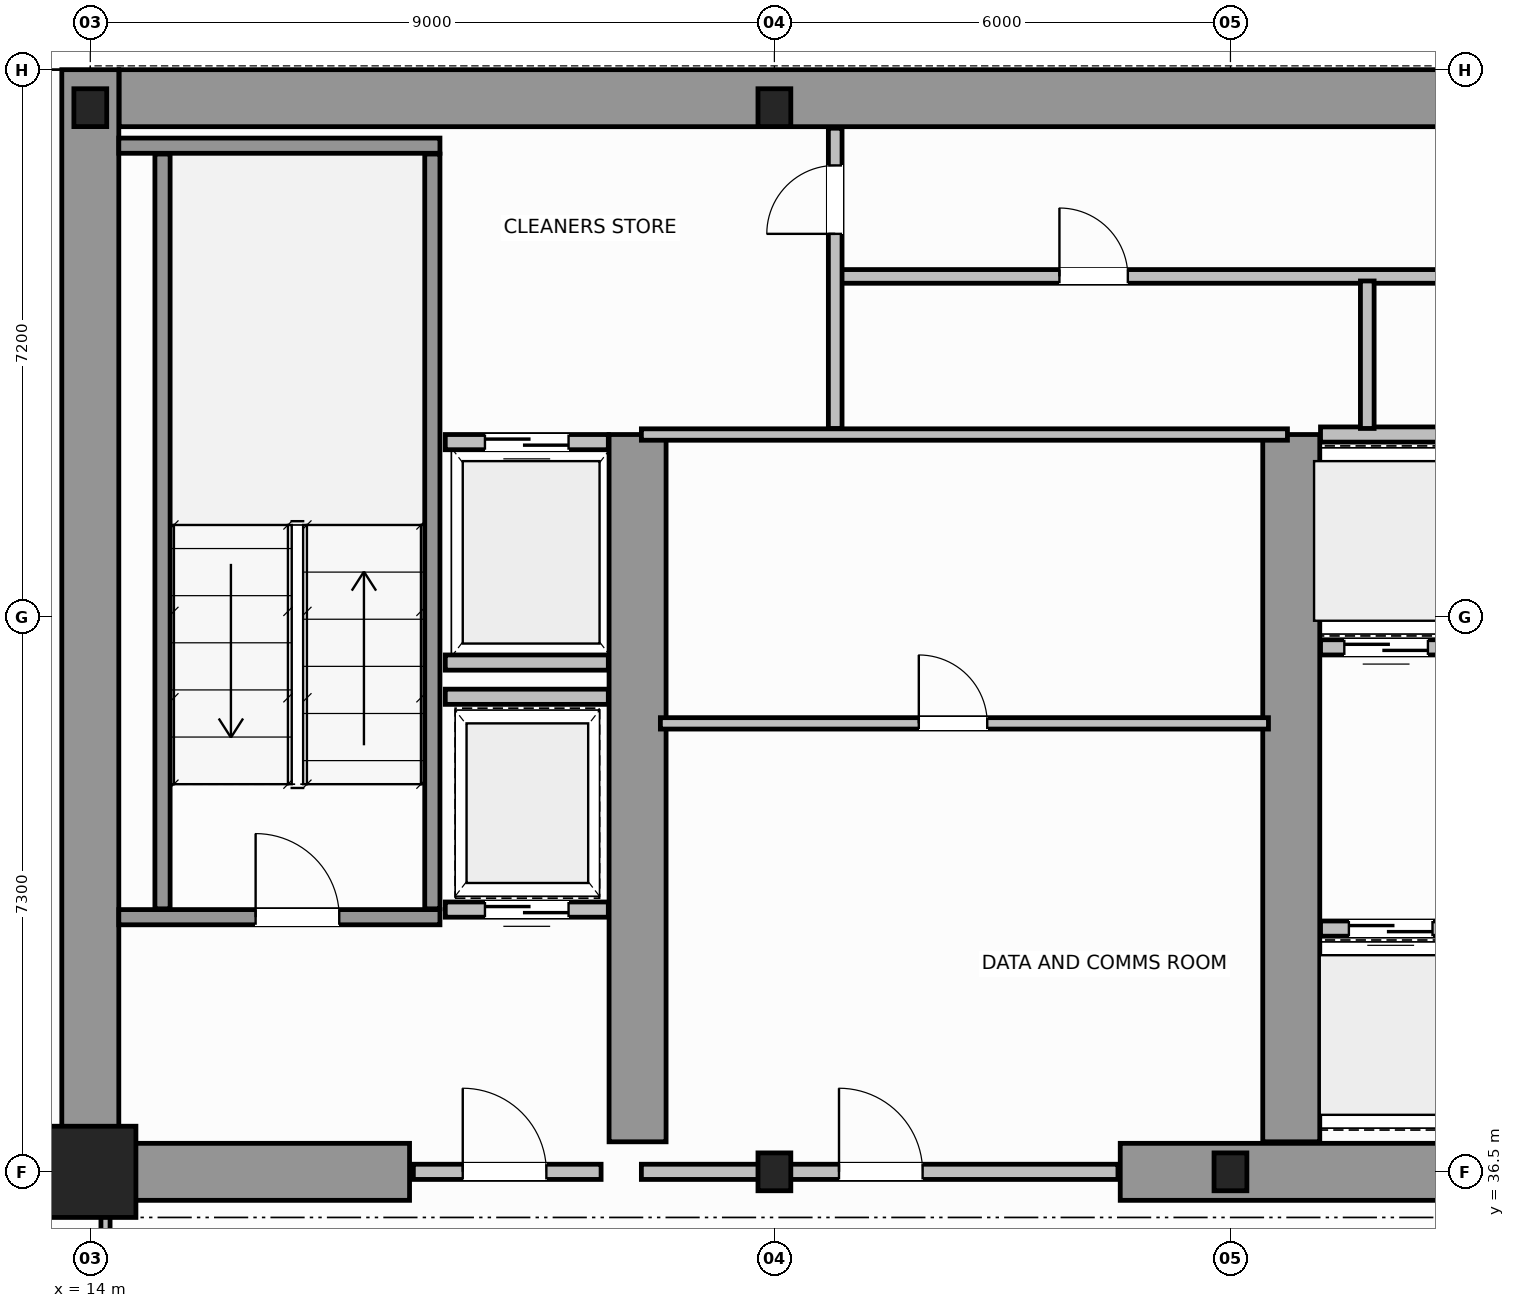
"""IFC4 building model, lengths in metres.
Left out: names, types, materials, properties, quantities, classifications, styles, units other than length and angle.
Written with IfcOpenShell. Run it as: python <this file> out.ifc"""

import sys

from ifc_helpers import new_model, si_unit, direction, frame, frame_2d, origin, origin_2d, place, context, subcontext, project, spatial, rectangle, i_section, extrude, source, transform, mapped, element, fill, save


model = new_model("IFC4")
c1 = context("Model", 3, precision=1e-05, world=origin(), true_north=direction((0.0, 1.0)))
c2 = subcontext(c1, "Body", "Model", "MODEL_VIEW")
j1 = project(units=[si_unit("LENGTHUNIT", "METRE"), si_unit("PLANEANGLEUNIT", "RADIAN")], contexts=[c1])
p1 = place(None, origin())
s1 = spatial("IfcSite", under=j1, at=p1, CompositionType="ELEMENT")
p2 = place(p1, origin())
s2 = spatial("IfcBuilding", under=s1, at=p2, CompositionType="ELEMENT")
p3 = place(p2, frame((0.0, 0.0, 153.8)))
s3 = spatial("IfcBuildingStorey", under=s2, at=p3, CompositionType="ELEMENT", Elevation=153.8)
m1 = source(origin(), c2, "Body", "SweptSolid", [
    extrude(rectangle(XDim=1.2, YDim=1.2, at=origin_2d()), origin(), (0.0, 0.0, 1.0), 3.8),
])
p4 = place(p3, frame((14.0, 36.5, 0.0), z_axis=(0.0, 0.0, 1.0), x_axis=(1.0, 0.0, 0.0)))
e1 = element("IfcColumn", 1, at=p4, inside=s3, PredefinedType="COLUMN", context=c2, shape_type="MappedRepresentation", body=[
    mapped(m1, transform((0.0, 0.0, 0.0), scale=1.0)),
])
m2 = source(origin(), c2, "Body", "SweptSolid", [
    extrude(i_section(OverallWidth=0.432, OverallDepth=0.498, WebThickness=0.055, FlangeThickness=0.068, FilletRadius=0.015, at=origin_2d()), origin(), (0.0, 0.0, 1.0), 3.8),
])
for number, where, z_axis, x_axis in (
    (2, (23.0, 36.5, 0.0), (0.0, 0.0, 1.0), (1.0, 0.0, 0.0)),
    (3, (29.0, 36.5, 0.0), (0.0, 0.0, 1.0), (1.0, 0.0, 0.0)),
    (4, (14.0, 50.5, 0.0), (0.0, 0.0, 1.0), (1.0, 0.0, 0.0)),
    (5, (23.0, 50.5, 0.0), (0.0, 0.0, 1.0), (1.0, 0.0, 0.0)),
):
    element("IfcColumn", number, at=place(p3, frame(where, z_axis=z_axis, x_axis=x_axis)), inside=s3, PredefinedType="COLUMN", context=c2, shape_type="MappedRepresentation", body=[
        mapped(m2, transform((0.0, 0.0, 0.0), scale=1.0)),
    ])
p5 = place(p3, frame((14.379, 50.625, 0.0), z_axis=(0.0, 0.0, 1.0), x_axis=(1.0, 0.0, 0.0)))
e6 = element("IfcWall", 6, at=p5, inside=s3, PredefinedType="SHEAR", context=c2, shape_type="SweptSolid", body=[
    extrude(rectangle(XDim=19.619, YDim=0.75, at=frame_2d((9.81, 0.0))), origin(), (0.0, 0.0, 1.0), 3.8),
])
p6 = place(p3, frame((14.0, 36.5, 0.0), z_axis=(0.0, 0.0, 1.0), x_axis=(0.0, 1.0, 0.0)))
e7 = element("IfcWall", 7, at=p6, inside=s3, PredefinedType="SHEAR", context=c2, shape_type="SweptSolid", body=[
    extrude(rectangle(XDim=14.5, YDim=0.75, at=frame_2d((7.25, 0.0))), origin(), (0.0, 0.0, 1.0), 3.8),
])
p7 = place(p3, frame((14.395, 36.5, 0.0), z_axis=(0.0, 0.0, 1.0), x_axis=(1.0, 0.0, 0.0)))
e8 = element("IfcWall", 8, at=p7, inside=s3, PredefinedType="SHEAR", context=c2, shape_type="SweptSolid", body=[
    extrude(rectangle(XDim=3.805, YDim=0.75, at=frame_2d((1.902, 0.0))), origin(), (0.0, 0.0, 1.0), 2.38),
])
p8 = place(p3, frame((27.55, 36.5, 0.0), z_axis=(0.0, 0.0, 1.0), x_axis=(1.0, 0.0, 0.0)))
e9 = element("IfcWall", 9, at=p8, inside=s3, PredefinedType="SHEAR", context=c2, shape_type="SweptSolid", body=[
    extrude(rectangle(XDim=4.5, YDim=0.75, at=frame_2d((2.25, 0.0))), origin(), (0.0, 0.0, 1.0), 3.8),
])
for number, where, z_axis, x_axis in (
    (10, (21.2, 36.895, 0.0), (0.0, 0.0, 1.0), (0.0, 1.0, 0.0)),
    (11, (29.8, 36.895, 0.0), (0.0, 0.0, 1.0), (0.0, 1.0, 0.0)),
):
    element("IfcWall", number, at=place(p3, frame(where, z_axis=z_axis, x_axis=x_axis)), inside=s3, PredefinedType="SHEAR", context=c2, shape_type="SweptSolid", body=[
        extrude(rectangle(XDim=9.305, YDim=0.75, at=frame_2d((4.652, 0.0))), origin(), (0.0, 0.0, 1.0), 3.8),
    ])
p9 = place(p3, frame((14.375, 39.85, 0.0), z_axis=(0.0, 0.0, 1.0), x_axis=(1.0, 0.0, 0.0)))
e12 = element("IfcWall", 12, at=p9, inside=s3, PredefinedType="SOLIDWALL", context=c2, shape_type="SweptSolid", body=[
    extrude(rectangle(XDim=4.225, YDim=0.2, at=frame_2d((2.113, 0.0))), origin(), (0.0, 0.0, 1.0), 3.8),
])
p10 = place(p9, frame((1.8, 0.0, 0.0)))
e13 = element("IfcOpeningElement", 13, at=p10, cuts=e12, PredefinedType="OPENING", context=c2, shape_type="SweptSolid", body=[
    extrude(rectangle(XDim=1.1, YDim=2.15, at=frame_2d((0.55, 1.075))), frame((0.0, 0.11, 0.0), z_axis=(0.0, -1.0, 0.0), x_axis=(1.0, 0.0, 0.0)), (0.0, 0.0, 1.0), 0.22),
])
p11 = place(p3, frame((14.375, 50.0, 0.0), z_axis=(0.0, 0.0, 1.0), x_axis=(1.0, 0.0, 0.0)))
e14 = element("IfcWall", 14, at=p11, inside=s3, PredefinedType="SOLIDWALL", context=c2, shape_type="SweptSolid", body=[
    extrude(rectangle(XDim=4.225, YDim=0.2, at=frame_2d((2.113, 0.0))), origin(), (0.0, 0.0, 1.0), 3.8),
])
for number, where, z_axis, x_axis in (
    (15, (14.95, 39.96, 0.0), (0.0, 0.0, 1.0), (0.0, 1.0, 0.0)),
    (16, (18.5, 39.96, 0.0), (0.0, 0.0, 1.0), (0.0, 1.0, 0.0)),
):
    element("IfcWall", number, at=place(p3, frame(where, z_axis=z_axis, x_axis=x_axis)), inside=s3, PredefinedType="SOLIDWALL", context=c2, shape_type="SweptSolid", body=[
        extrude(rectangle(XDim=9.93, YDim=0.2, at=frame_2d((4.965, 0.0))), origin(), (0.0, 0.0, 1.0), 3.8),
    ])
p12 = place(p3, frame((18.25, 36.5, 0.0), z_axis=(0.0, 0.0, 1.0), x_axis=(1.0, 0.0, 0.0)))
e17 = element("IfcWall", 17, at=p12, inside=s3, PredefinedType="SOLIDWALL", context=c2, shape_type="SweptSolid", body=[
    extrude(rectangle(XDim=2.47, YDim=0.2, at=frame_2d((1.235, 0.0))), origin(), (0.0, 0.0, 1.0), 2.37),
])
p13 = place(p12, frame((0.65, 0.0, 0.0)))
e18 = element("IfcOpeningElement", 18, at=p13, cuts=e17, PredefinedType="OPENING", context=c2, shape_type="SweptSolid", body=[
    extrude(rectangle(XDim=1.1, YDim=2.15, at=frame_2d((0.55, 1.075))), frame((0.0, 0.11, 0.0), z_axis=(0.0, -1.0, 0.0), x_axis=(1.0, 0.0, 0.0)), (0.0, 0.0, 1.0), 0.22),
])
p14 = place(p3, frame((30.185, 39.7, 0.0), z_axis=(0.0, 0.0, 1.0), x_axis=(1.0, 0.0, 0.0)))
e19 = element("IfcWall", 19, at=p14, inside=s3, PredefinedType="SOLIDWALL", context=c2, shape_type="SweptSolid", body=[
    extrude(rectangle(XDim=1.845, YDim=0.2, at=frame_2d((0.922, 0.0))), origin(), (0.0, 0.0, 1.0), 3.58),
])
p15 = place(p14, frame((0.373, 0.0, 0.0)))
e20 = element("IfcOpeningElement", 20, at=p15, cuts=e19, PredefinedType="OPENING", context=c2, shape_type="SweptSolid", body=[
    extrude(rectangle(XDim=1.1, YDim=2.15, at=frame_2d((0.55, 1.075))), frame((0.0, 0.11, 0.0), z_axis=(0.0, -1.0, 0.0), x_axis=(1.0, 0.0, 0.0)), (0.0, 0.0, 1.0), 0.22),
])
p16 = place(p3, frame((30.185, 43.4, 0.0), z_axis=(0.0, 0.0, 1.0), x_axis=(1.0, 0.0, 0.0)))
e21 = element("IfcWall", 21, at=p16, inside=s3, PredefinedType="SOLIDWALL", context=c2, shape_type="SweptSolid", body=[
    extrude(rectangle(XDim=1.725, YDim=0.2, at=frame_2d((0.862, 0.0))), origin(), (0.0, 0.0, 1.0), 3.58),
])
p17 = place(p16, frame((0.313, 0.0, 0.0)))
e22 = element("IfcOpeningElement", 22, at=p17, cuts=e21, PredefinedType="OPENING", context=c2, shape_type="SweptSolid", body=[
    extrude(rectangle(XDim=1.1, YDim=2.15, at=frame_2d((0.55, 1.075))), frame((0.0, 0.11, 0.0), z_axis=(0.0, -1.0, 0.0), x_axis=(1.0, 0.0, 0.0)), (0.0, 0.0, 1.0), 0.22),
])
p18 = place(p3, frame((30.185, 46.2, 0.0), z_axis=(0.0, 0.0, 1.0), x_axis=(1.0, 0.0, 0.0)))
e23 = element("IfcWall", 23, at=p18, inside=s3, PredefinedType="SOLIDWALL", context=c2, shape_type="SweptSolid", body=[
    extrude(rectangle(XDim=1.725, YDim=0.2, at=frame_2d((0.862, 0.0))), origin(), (0.0, 0.0, 1.0), 3.58),
])
p19 = place(p3, frame((18.67, 46.1, 0.0), z_axis=(0.0, 0.0, 1.0), x_axis=(1.0, 0.0, 0.0)))
e24 = element("IfcWall", 24, at=p19, inside=s3, PredefinedType="SOLIDWALL", context=c2, shape_type="SweptSolid", body=[
    extrude(rectangle(XDim=2.145, YDim=0.2, at=frame_2d((1.073, 0.0))), origin(), (0.0, 0.0, 1.0), 3.58),
])
p20 = place(p19, frame((0.522, 0.0, 0.0)))
e25 = element("IfcOpeningElement", 25, at=p20, cuts=e24, PredefinedType="OPENING", context=c2, shape_type="SweptSolid", body=[
    extrude(rectangle(XDim=1.1, YDim=2.15, at=frame_2d((0.55, 1.075))), frame((0.0, 0.11, 0.0), z_axis=(0.0, -1.0, 0.0), x_axis=(1.0, 0.0, 0.0)), (0.0, 0.0, 1.0), 0.22),
])
p21 = place(p3, frame((18.67, 43.2, 0.0), z_axis=(0.0, 0.0, 1.0), x_axis=(1.0, 0.0, 0.0)))
e26 = element("IfcWall", 26, at=p21, inside=s3, PredefinedType="SOLIDWALL", context=c2, shape_type="SweptSolid", body=[
    extrude(rectangle(XDim=2.145, YDim=0.2, at=frame_2d((1.073, 0.0))), origin(), (0.0, 0.0, 1.0), 3.58),
])
p22 = place(p3, frame((18.67, 39.95, 0.0), z_axis=(0.0, 0.0, 1.0), x_axis=(1.0, 0.0, 0.0)))
e27 = element("IfcWall", 27, at=p22, inside=s3, PredefinedType="SOLIDWALL", context=c2, shape_type="SweptSolid", body=[
    extrude(rectangle(XDim=2.145, YDim=0.2, at=frame_2d((1.073, 0.0))), origin(), (0.0, 0.0, 1.0), 3.58),
])
p23 = place(p22, frame((0.522, 0.0, 0.0)))
e28 = element("IfcOpeningElement", 28, at=p23, cuts=e27, PredefinedType="OPENING", context=c2, shape_type="SweptSolid", body=[
    extrude(rectangle(XDim=1.1, YDim=2.15, at=frame_2d((0.55, 1.075))), frame((0.0, 0.11, 0.0), z_axis=(0.0, -1.0, 0.0), x_axis=(1.0, 0.0, 0.0)), (0.0, 0.0, 1.0), 0.22),
])
p24 = place(p3, frame((18.67, 42.75, 0.0), z_axis=(0.0, 0.0, 1.0), x_axis=(1.0, 0.0, 0.0)))
e29 = element("IfcWall", 29, at=p24, inside=s3, PredefinedType="SOLIDWALL", context=c2, shape_type="SweptSolid", body=[
    extrude(rectangle(XDim=2.145, YDim=0.2, at=frame_2d((1.073, 0.0))), origin(), (0.0, 0.0, 1.0), 3.58),
])
p25 = place(p3, frame((21.25, 36.5, 0.0), z_axis=(0.0, 0.0, 1.0), x_axis=(1.0, 0.0, 0.0)))
e30 = element("IfcWall", 30, at=p25, inside=s3, PredefinedType="SOLIDWALL", context=c2, shape_type="SweptSolid", body=[
    extrude(rectangle(XDim=6.27, YDim=0.2, at=frame_2d((3.135, 0.0))), origin(), (0.0, 0.0, 1.0), 2.37),
])
p26 = place(p25, frame((2.6, 0.0, 0.0)))
e31 = element("IfcOpeningElement", 31, at=p26, cuts=e30, PredefinedType="OPENING", context=c2, shape_type="SweptSolid", body=[
    extrude(rectangle(XDim=1.1, YDim=2.15, at=frame_2d((0.55, 1.075))), frame((0.0, 0.11, 0.0), z_axis=(0.0, -1.0, 0.0), x_axis=(1.0, 0.0, 0.0)), (0.0, 0.0, 1.0), 0.22),
])
p27 = place(p3, frame((21.25, 46.2, 0.0), z_axis=(0.0, 0.0, 1.0), x_axis=(1.0, 0.0, 0.0)))
e32 = element("IfcWall", 32, at=p27, inside=s3, PredefinedType="PARTITIONING", context=c2, shape_type="SweptSolid", body=[
    extrude(rectangle(XDim=8.5, YDim=0.15, at=frame_2d((4.25, 0.0))), origin(), (0.0, 0.0, 1.0), 3.58),
])
p28 = place(p3, frame((21.5, 42.4, 0.0), z_axis=(0.0, 0.0, 1.0), x_axis=(1.0, 0.0, 0.0)))
e33 = element("IfcWall", 33, at=p28, inside=s3, PredefinedType="PARTITIONING", context=c2, shape_type="SweptSolid", body=[
    extrude(rectangle(XDim=8.0, YDim=0.15, at=frame_2d((4.0, 0.0))), origin(), (0.0, 0.0, 1.0), 3.58),
])
p29 = place(p28, frame((3.4, 0.0, 0.0)))
e34 = element("IfcOpeningElement", 34, at=p29, cuts=e33, PredefinedType="OPENING", context=c2, shape_type="SweptSolid", body=[
    extrude(rectangle(XDim=0.9, YDim=2.1, at=frame_2d((0.45, 1.05))), frame((0.0, 0.085, 0.0), z_axis=(0.0, -1.0, 0.0), x_axis=(1.0, 0.0, 0.0)), (0.0, 0.0, 1.0), 0.17),
])
p30 = place(p3, frame((23.85, 48.28, 0.0), z_axis=(0.0, 0.0, 1.0), x_axis=(1.0, 0.0, 0.0)))
e35 = element("IfcWall", 35, at=p30, inside=s3, PredefinedType="PLUMBINGWALL", context=c2, shape_type="SweptSolid", body=[
    extrude(rectangle(XDim=15.03, YDim=0.18, at=frame_2d((7.515, 0.0))), origin(), (0.0, 0.0, 1.0), 3.58),
])
p31 = place(p30, frame((2.9, 0.0, 0.0)))
e36 = element("IfcOpeningElement", 36, at=p31, cuts=e35, PredefinedType="OPENING", context=c2, shape_type="SweptSolid", body=[
    extrude(rectangle(XDim=0.9, YDim=2.15, at=frame_2d((0.45, 1.075))), frame((0.0, 0.1, 0.0), z_axis=(0.0, -1.0, 0.0), x_axis=(1.0, 0.0, 0.0)), (0.0, 0.0, 1.0), 0.2),
])
p32 = place(p30, frame((10.4, 0.0, 0.0)))
e37 = element("IfcOpeningElement", 37, at=p32, cuts=e35, PredefinedType="OPENING", context=c2, shape_type="SweptSolid", body=[
    extrude(rectangle(XDim=0.9, YDim=2.15, at=frame_2d((0.45, 1.075))), frame((0.0, 0.1, 0.0), z_axis=(0.0, -1.0, 0.0), x_axis=(1.0, 0.0, 0.0)), (0.0, 0.0, 1.0), 0.2),
])
p33 = place(p3, frame((23.8, 46.28, 0.0), z_axis=(0.0, 0.0, 1.0), x_axis=(0.0, 1.0, 0.0)))
e38 = element("IfcWall", 38, at=p33, inside=s3, PredefinedType="PLUMBINGWALL", context=c2, shape_type="SweptSolid", body=[
    extrude(rectangle(XDim=3.95, YDim=0.18, at=frame_2d((1.975, 0.0))), origin(), (0.0, 0.0, 1.0), 3.58),
])
p34 = place(p33, frame((2.56, 0.0, 0.0)))
e39 = element("IfcOpeningElement", 39, at=p34, cuts=e38, PredefinedType="OPENING", context=c2, shape_type="SweptSolid", body=[
    extrude(rectangle(XDim=0.9, YDim=2.15, at=frame_2d((0.45, 1.075))), frame((0.0, 0.1, 0.0), z_axis=(0.0, -1.0, 0.0), x_axis=(1.0, 0.0, 0.0)), (0.0, 0.0, 1.0), 0.2),
])
p35 = place(p3, frame((30.8, 46.28, 0.0), z_axis=(0.0, 0.0, 1.0), x_axis=(0.0, 1.0, 0.0)))
e40 = element("IfcWall", 40, at=p35, inside=s3, PredefinedType="PLUMBINGWALL", context=c2, shape_type="SweptSolid", body=[
    extrude(rectangle(XDim=1.94, YDim=0.18, at=frame_2d((0.97, 0.0))), origin(), (0.0, 0.0, 1.0), 3.58),
])
p36 = place(p3, frame((14.2, 34.0, 0.0), z_axis=(0.0, 0.0, 1.0), x_axis=(0.0, 1.0, 0.0)))
e41 = element("IfcWall", 41, at=p36, inside=s3, PredefinedType="PARTITIONING", context=c2, shape_type="SweptSolid", body=[
    extrude(rectangle(XDim=2.44, YDim=0.12, at=frame_2d((1.22, 0.0))), origin(), (0.0, 0.0, 1.0), 3.58),
])
p37 = place(p36, frame((0.7, 0.0, 0.0)))
e42 = element("IfcOpeningElement", 42, at=p37, cuts=e41, PredefinedType="OPENING", context=c2, shape_type="SweptSolid", body=[
    extrude(rectangle(XDim=0.9, YDim=2.15, at=frame_2d((0.45, 1.075))), frame((0.0, 0.07, 0.0), z_axis=(0.0, -1.0, 0.0), x_axis=(1.0, 0.0, 0.0)), (0.0, 0.0, 1.0), 0.14),
])
m3 = source(origin(), c2, "Body", "SweptSolid", [
    extrude(rectangle(XDim=1.1, YDim=2.15, at=frame_2d((0.55, 1.075))), frame((0.0, 0.025, 0.0), z_axis=(0.0, -1.0, 0.0), x_axis=(1.0, 0.0, 0.0)), (0.0, 0.0, 1.0), 0.05),
])
p38 = place(p10, origin())
e43 = element("IfcDoor", 43, at=p38, inside=s3, OperationType="SINGLE_SWING_LEFT", PredefinedType="DOOR", context=c2, shape_type="MappedRepresentation", body=[
    mapped(m3, transform((0.0, 0.0, 0.0), scale=1.0)),
])
fill(e13, e43)
p39 = place(p13, origin())
e44 = element("IfcDoor", 44, at=p39, inside=s3, OperationType="SINGLE_SWING_RIGHT", PredefinedType="DOOR", context=c2, shape_type="MappedRepresentation", body=[
    mapped(m3, transform((0.0, 0.0, 0.0), scale=1.0)),
])
fill(e18, e44)
p40 = place(p15, origin())
e45 = element("IfcDoor", 45, at=p40, inside=s3, OperationType="DOUBLE_DOOR_SLIDING", PredefinedType="DOOR", context=c2, shape_type="MappedRepresentation", body=[
    mapped(m3, transform((0.0, 0.0, 0.0), scale=1.0)),
])
fill(e20, e45)
p41 = place(p17, origin())
e46 = element("IfcDoor", 46, at=p41, inside=s3, OperationType="DOUBLE_DOOR_SLIDING", PredefinedType="DOOR", context=c2, shape_type="MappedRepresentation", body=[
    mapped(m3, transform((0.0, 0.0, 0.0), scale=1.0)),
])
fill(e22, e46)
p42 = place(p20, origin())
e47 = element("IfcDoor", 47, at=p42, inside=s3, OperationType="DOUBLE_DOOR_SLIDING", PredefinedType="DOOR", context=c2, shape_type="MappedRepresentation", body=[
    mapped(m3, transform((0.0, 0.0, 0.0), scale=1.0)),
])
fill(e25, e47)
p43 = place(p23, origin())
e48 = element("IfcDoor", 48, at=p43, inside=s3, OperationType="DOUBLE_DOOR_SLIDING", PredefinedType="DOOR", context=c2, shape_type="MappedRepresentation", body=[
    mapped(m3, transform((0.0, 0.0, 0.0), scale=1.0)),
])
fill(e28, e48)
p44 = place(p26, origin())
e49 = element("IfcDoor", 49, at=p44, inside=s3, OperationType="SINGLE_SWING_LEFT", PredefinedType="DOOR", context=c2, shape_type="MappedRepresentation", body=[
    mapped(m3, transform((0.0, 0.0, 0.0), scale=1.0)),
])
fill(e31, e49)
m4 = source(origin(), c2, "Body", "SweptSolid", [
    extrude(rectangle(XDim=0.9, YDim=2.1, at=frame_2d((0.45, 1.05))), frame((0.0, 0.025, 0.0), z_axis=(0.0, -1.0, 0.0), x_axis=(1.0, 0.0, 0.0)), (0.0, 0.0, 1.0), 0.05),
])
p45 = place(p29, origin())
e50 = element("IfcDoor", 50, at=p45, inside=s3, OperationType="SINGLE_SWING_RIGHT", PredefinedType="DOOR", context=c2, shape_type="MappedRepresentation", body=[
    mapped(m4, transform((0.0, 0.0, 0.0), scale=1.0)),
])
fill(e34, e50)
m5 = source(origin(), c2, "Body", "SweptSolid", [
    extrude(rectangle(XDim=0.9, YDim=2.15, at=frame_2d((0.45, 1.075))), frame((0.0, 0.025, 0.0), z_axis=(0.0, -1.0, 0.0), x_axis=(1.0, 0.0, 0.0)), (0.0, 0.0, 1.0), 0.05),
])
p46 = place(p34, origin())
e51 = element("IfcDoor", 51, at=p46, inside=s3, OperationType="SINGLE_SWING_LEFT", PredefinedType="DOOR", context=c2, shape_type="MappedRepresentation", body=[
    mapped(m5, transform((0.0, 0.0, 0.0), scale=1.0)),
])
fill(e39, e51)
p47 = place(p31, origin())
e52 = element("IfcDoor", 52, at=p47, inside=s3, OperationType="SINGLE_SWING_RIGHT", PredefinedType="DOOR", context=c2, shape_type="MappedRepresentation", body=[
    mapped(m5, transform((0.0, 0.0, 0.0), scale=1.0)),
])
fill(e36, e52)
save(model, sys.argv[1])
